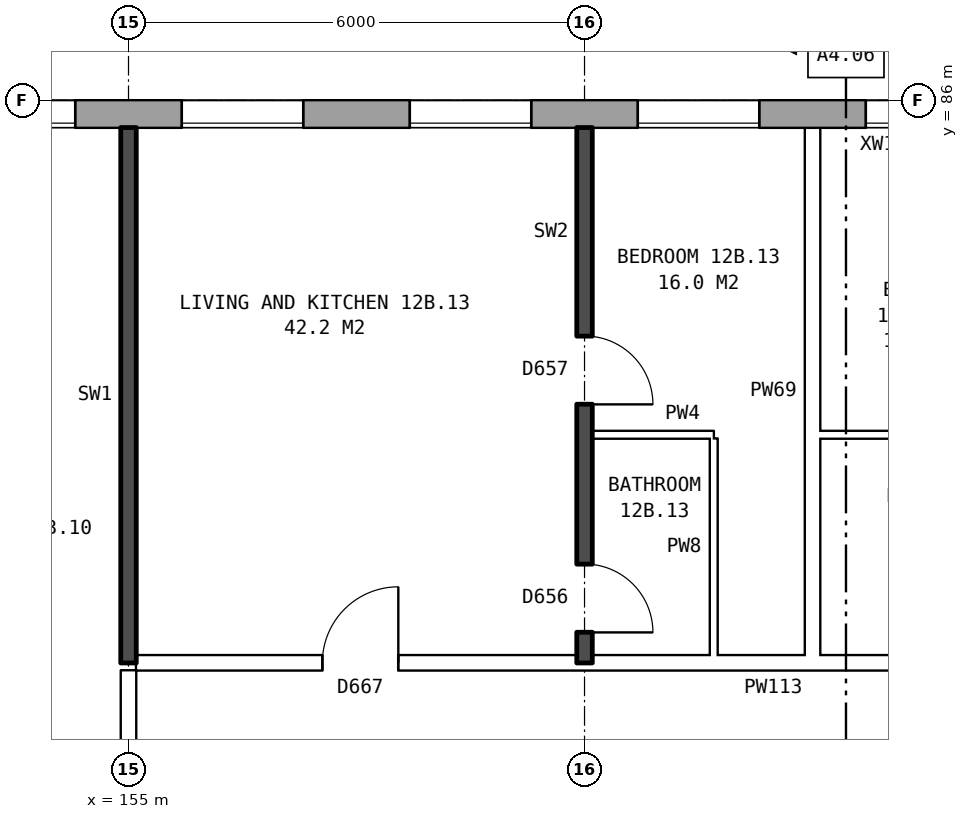
"""IFC4 building model, lengths in metres.
Left out: names, types, materials, properties, quantities, classifications, styles, units other than length and angle.
Written with IfcOpenShell. Run it as: python <this file> out.ifc"""

import sys

from ifc_helpers import new_model, si_unit, direction, frame, frame_2d, origin, place, context, subcontext, project, spatial, rectangle, extrude, element, fill, save


model = new_model("IFC4")
c1 = context("Model", 3, precision=1e-05, world=origin(), true_north=direction((0.0, 1.0)))
c2 = subcontext(c1, "Body", "Model", "MODEL_VIEW")
j1 = project(units=[si_unit("LENGTHUNIT", "METRE"), si_unit("PLANEANGLEUNIT", "RADIAN")], contexts=[c1])
p1 = place(None, origin())
s1 = spatial("IfcSite", under=j1, at=p1, CompositionType="ELEMENT")
p2 = place(p1, origin())
s2 = spatial("IfcBuilding", under=s1, at=p2, CompositionType="ELEMENT")
p3 = place(p2, frame((0.0, 0.0, 47.4)))
s3 = spatial("IfcBuildingStorey", under=s2, at=p3, CompositionType="ELEMENT", Elevation=47.4)
p4 = place(p3, frame((173.425, 85.82, 0.0), z_axis=(0.0, 0.0, 1.0), x_axis=(-1.0, 0.0, 0.0)))
e1 = element("IfcWall", 1, at=p4, inside=s3, PredefinedType="STANDARD", context=c2, shape_type="SweptSolid", body=[
    extrude(rectangle(XDim=39.351, YDim=0.36, at=frame_2d((19.675, 0.0))), origin(), (0.0, 0.0, 1.0), 2.85),
])
p5 = place(p4, frame((0.625, 0.0, 0.8)))
e2 = element("IfcOpeningElement", 2, at=p5, cuts=e1, PredefinedType="OPENING", context=c2, shape_type="SweptSolid", body=[
    extrude(rectangle(XDim=1.0, YDim=1.8, at=frame_2d((0.5, 0.9))), frame((0.0, 0.19, 0.0), z_axis=(0.0, -1.0, 0.0), x_axis=(1.0, 0.0, 0.0)), (0.0, 0.0, 1.0), 0.38),
])
p6 = place(p4, frame((1.925, 0.0, 1.7)))
e3 = element("IfcOpeningElement", 3, at=p6, cuts=e1, PredefinedType="OPENING", context=c2, shape_type="SweptSolid", body=[
    extrude(rectangle(XDim=0.8, YDim=0.9, at=frame_2d((0.4, 0.45))), frame((0.0, 0.19, 0.0), z_axis=(0.0, -1.0, 0.0), x_axis=(1.0, 0.0, 0.0)), (0.0, 0.0, 1.0), 0.38),
])
p7 = place(p4, frame((7.125, 0.0, 0.8)))
e4 = element("IfcOpeningElement", 4, at=p7, cuts=e1, PredefinedType="OPENING", context=c2, shape_type="SweptSolid", body=[
    extrude(rectangle(XDim=1.6, YDim=1.8, at=frame_2d((0.8, 0.9))), frame((0.0, 0.19, 0.0), z_axis=(0.0, -1.0, 0.0), x_axis=(1.0, 0.0, 0.0)), (0.0, 0.0, 1.0), 0.38),
])
p8 = place(p4, frame((10.125, 0.0, 0.8)))
e5 = element("IfcOpeningElement", 5, at=p8, cuts=e1, PredefinedType="OPENING", context=c2, shape_type="SweptSolid", body=[
    extrude(rectangle(XDim=1.6, YDim=1.8, at=frame_2d((0.8, 0.9))), frame((0.0, 0.19, 0.0), z_axis=(0.0, -1.0, 0.0), x_axis=(1.0, 0.0, 0.0)), (0.0, 0.0, 1.0), 0.38),
])
p9 = place(p4, frame((13.125, 0.0, 0.8)))
e6 = element("IfcOpeningElement", 6, at=p9, cuts=e1, PredefinedType="OPENING", context=c2, shape_type="SweptSolid", body=[
    extrude(rectangle(XDim=1.6, YDim=1.8, at=frame_2d((0.8, 0.9))), frame((0.0, 0.19, 0.0), z_axis=(0.0, -1.0, 0.0), x_axis=(1.0, 0.0, 0.0)), (0.0, 0.0, 1.0), 0.38),
])
p10 = place(p4, frame((16.125, 0.0, 0.8)))
e7 = element("IfcOpeningElement", 7, at=p10, cuts=e1, PredefinedType="OPENING", context=c2, shape_type="SweptSolid", body=[
    extrude(rectangle(XDim=1.6, YDim=1.8, at=frame_2d((0.8, 0.9))), frame((0.0, 0.19, 0.0), z_axis=(0.0, -1.0, 0.0), x_axis=(1.0, 0.0, 0.0)), (0.0, 0.0, 1.0), 0.38),
])
p11 = place(p4, frame((19.125, 0.0, 0.8)))
e8 = element("IfcOpeningElement", 8, at=p11, cuts=e1, PredefinedType="OPENING", context=c2, shape_type="SweptSolid", body=[
    extrude(rectangle(XDim=1.6, YDim=1.8, at=frame_2d((0.8, 0.9))), frame((0.0, 0.19, 0.0), z_axis=(0.0, -1.0, 0.0), x_axis=(1.0, 0.0, 0.0)), (0.0, 0.0, 1.0), 0.38),
])
p12 = place(p4, frame((22.125, 0.0, 0.8)))
e9 = element("IfcOpeningElement", 9, at=p12, cuts=e1, PredefinedType="OPENING", context=c2, shape_type="SweptSolid", body=[
    extrude(rectangle(XDim=1.6, YDim=1.8, at=frame_2d((0.8, 0.9))), frame((0.0, 0.19, 0.0), z_axis=(0.0, -1.0, 0.0), x_axis=(1.0, 0.0, 0.0)), (0.0, 0.0, 1.0), 0.38),
])
p13 = place(p4, frame((25.125, 0.0, 0.8)))
e10 = element("IfcOpeningElement", 10, at=p13, cuts=e1, PredefinedType="OPENING", context=c2, shape_type="SweptSolid", body=[
    extrude(rectangle(XDim=1.6, YDim=1.8, at=frame_2d((0.8, 0.9))), frame((0.0, 0.19, 0.0), z_axis=(0.0, -1.0, 0.0), x_axis=(1.0, 0.0, 0.0)), (0.0, 0.0, 1.0), 0.38),
])
p14 = place(p4, frame((28.125, 0.0, 0.8)))
e11 = element("IfcOpeningElement", 11, at=p14, cuts=e1, PredefinedType="OPENING", context=c2, shape_type="SweptSolid", body=[
    extrude(rectangle(XDim=1.6, YDim=1.8, at=frame_2d((0.8, 0.9))), frame((0.0, 0.19, 0.0), z_axis=(0.0, -1.0, 0.0), x_axis=(1.0, 0.0, 0.0)), (0.0, 0.0, 1.0), 0.38),
])
p15 = place(p4, frame((31.125, 0.0, 0.8)))
e12 = element("IfcOpeningElement", 12, at=p15, cuts=e1, PredefinedType="OPENING", context=c2, shape_type="SweptSolid", body=[
    extrude(rectangle(XDim=1.6, YDim=1.8, at=frame_2d((0.8, 0.9))), frame((0.0, 0.19, 0.0), z_axis=(0.0, -1.0, 0.0), x_axis=(1.0, 0.0, 0.0)), (0.0, 0.0, 1.0), 0.38),
])
p16 = place(p4, frame((33.025, 0.0, 0.8)))
e13 = element("IfcOpeningElement", 13, at=p16, cuts=e1, PredefinedType="OPENING", context=c2, shape_type="SweptSolid", body=[
    extrude(rectangle(XDim=1.2, YDim=1.8, at=frame_2d((0.6, 0.9))), frame((0.0, 0.19, 0.0), z_axis=(0.0, -1.0, 0.0), x_axis=(1.0, 0.0, 0.0)), (0.0, 0.0, 1.0), 0.38),
])
p17 = place(p4, frame((36.625, 0.0, 1.7)))
e14 = element("IfcOpeningElement", 14, at=p17, cuts=e1, PredefinedType="OPENING", context=c2, shape_type="SweptSolid", body=[
    extrude(rectangle(XDim=0.8, YDim=0.9, at=frame_2d((0.4, 0.45))), frame((0.0, 0.19, 0.0), z_axis=(0.0, -1.0, 0.0), x_axis=(1.0, 0.0, 0.0)), (0.0, 0.0, 1.0), 0.38),
])
p18 = place(p4, frame((3.925, 0.0, 0.8)))
e15 = element("IfcOpeningElement", 15, at=p18, cuts=e1, PredefinedType="OPENING", context=c2, shape_type="SweptSolid", body=[
    extrude(rectangle(XDim=0.8, YDim=0.9, at=frame_2d((0.4, 0.45))), frame((0.0, 0.19, 0.0), z_axis=(0.0, -1.0, 0.0), x_axis=(1.0, 0.0, 0.0)), (0.0, 0.0, 1.0), 0.38),
])
p19 = place(p4, frame((5.025, 0.0, 0.8)))
e16 = element("IfcOpeningElement", 16, at=p19, cuts=e1, PredefinedType="OPENING", context=c2, shape_type="SweptSolid", body=[
    extrude(rectangle(XDim=1.2, YDim=1.8, at=frame_2d((0.6, 0.9))), frame((0.0, 0.19, 0.0), z_axis=(0.0, -1.0, 0.0), x_axis=(1.0, 0.0, 0.0)), (0.0, 0.0, 1.0), 0.38),
])
p20 = place(p4, frame((34.525, 0.0, 0.8)))
e17 = element("IfcOpeningElement", 17, at=p20, cuts=e1, PredefinedType="OPENING", context=c2, shape_type="SweptSolid", body=[
    extrude(rectangle(XDim=0.8, YDim=0.9, at=frame_2d((0.4, 0.45))), frame((0.0, 0.19, 0.0), z_axis=(0.0, -1.0, 0.0), x_axis=(1.0, 0.0, 0.0)), (0.0, 0.0, 1.0), 0.38),
])
p21 = place(p4, frame((37.725, 0.0, 0.8)))
e18 = element("IfcOpeningElement", 18, at=p21, cuts=e1, PredefinedType="OPENING", context=c2, shape_type="SweptSolid", body=[
    extrude(rectangle(XDim=1.2, YDim=1.8, at=frame_2d((0.6, 0.9))), frame((0.0, 0.19, 0.0), z_axis=(0.0, -1.0, 0.0), x_axis=(1.0, 0.0, 0.0)), (0.0, 0.0, 1.0), 0.38),
])
p22 = place(p3, frame((155.1, 78.6, 0.0), z_axis=(0.0, 0.0, 1.0), x_axis=(1.0, 0.0, 0.0)))
e19 = element("IfcWall", 19, at=p22, inside=s3, PredefinedType="PARTITIONING", context=c2, shape_type="SweptSolid", body=[
    extrude(rectangle(XDim=21.04, YDim=0.2, at=frame_2d((10.52, 0.0))), origin(), (0.0, 0.0, 1.0), 2.85),
])
p23 = place(p22, frame((2.45, 0.0, 0.0)))
e20 = element("IfcOpeningElement", 20, at=p23, cuts=e19, PredefinedType="OPENING", context=c2, shape_type="SweptSolid", body=[
    extrude(rectangle(XDim=1.0, YDim=2.1, at=frame_2d((0.5, 1.05))), frame((0.0, 0.11, 0.0), z_axis=(0.0, -1.0, 0.0), x_axis=(1.0, 0.0, 0.0)), (0.0, 0.0, 1.0), 0.22),
])
p24 = place(p22, frame((14.4, 0.0, 0.0)))
e21 = element("IfcOpeningElement", 21, at=p24, cuts=e19, PredefinedType="OPENING", context=c2, shape_type="SweptSolid", body=[
    extrude(rectangle(XDim=1.0, YDim=2.1, at=frame_2d((0.5, 1.05))), frame((0.0, 0.11, 0.0), z_axis=(0.0, -1.0, 0.0), x_axis=(1.0, 0.0, 0.0)), (0.0, 0.0, 1.0), 0.22),
])
p25 = place(p3, frame((161.1, 81.6, 0.0), z_axis=(0.0, 0.0, 1.0), x_axis=(1.0, 0.0, 0.0)))
e22 = element("IfcWall", 22, at=p25, inside=s3, PredefinedType="PARTITIONING", context=c2, shape_type="SweptSolid", body=[
    extrude(rectangle(XDim=1.6, YDim=0.1, at=frame_2d((0.8, 0.0))), origin(), (0.0, 0.0, 1.0), 2.85),
])
p26 = place(p3, frame((164.1, 81.6, 0.0), z_axis=(0.0, 0.0, 1.0), x_axis=(1.0, 0.0, 0.0)))
e23 = element("IfcWall", 23, at=p26, inside=s3, PredefinedType="PARTITIONING", context=c2, shape_type="SweptSolid", body=[
    extrude(rectangle(XDim=2.8, YDim=0.1, at=frame_2d((1.4, 0.0))), origin(), (0.0, 0.0, 1.0), 2.85),
])
p27 = place(p3, frame((155.0, 76.3, 0.0), z_axis=(0.0, 0.0, 1.0), x_axis=(0.0, 1.0, 0.0)))
e24 = element("IfcWall", 24, at=p27, inside=s3, PredefinedType="PARTITIONING", context=c2, shape_type="SweptSolid", body=[
    extrude(rectangle(XDim=2.2, YDim=0.2, at=frame_2d((1.1, 0.0))), origin(), (0.0, 0.0, 1.0), 2.85),
])
p28 = place(p3, frame((155.0, 78.6, 0.0), z_axis=(0.0, 0.0, 1.0), x_axis=(0.0, 1.0, 0.0)))
e25 = element("IfcWall", 25, at=p28, inside=s3, PredefinedType="SOLIDWALL", context=c2, shape_type="SweptSolid", body=[
    extrude(rectangle(XDim=7.04, YDim=0.2, at=frame_2d((3.52, 0.0))), origin(), (0.0, 0.0, 1.0), 2.85),
])
p29 = place(p3, frame((161.0, 78.6, 0.0), z_axis=(0.0, 0.0, 1.0), x_axis=(0.0, 1.0, 0.0)))
e26 = element("IfcWall", 26, at=p29, inside=s3, PredefinedType="SOLIDWALL", context=c2, shape_type="SweptSolid", body=[
    extrude(rectangle(XDim=7.04, YDim=0.2, at=frame_2d((3.52, 0.0))), origin(), (0.0, 0.0, 1.0), 2.85),
])
p30 = place(p29, frame((3.4, 0.0, 0.0)))
e27 = element("IfcOpeningElement", 27, at=p30, cuts=e26, PredefinedType="OPENING", context=c2, shape_type="SweptSolid", body=[
    extrude(rectangle(XDim=0.9, YDim=2.1, at=frame_2d((0.45, 1.05))), frame((0.0, 0.11, 0.0), z_axis=(0.0, -1.0, 0.0), x_axis=(1.0, 0.0, 0.0)), (0.0, 0.0, 1.0), 0.22),
])
p31 = place(p29, frame((0.4, 0.0, 0.0)))
e28 = element("IfcOpeningElement", 28, at=p31, cuts=e26, PredefinedType="OPENING", context=c2, shape_type="SweptSolid", body=[
    extrude(rectangle(XDim=0.9, YDim=2.1, at=frame_2d((0.45, 1.05))), frame((0.0, 0.11, 0.0), z_axis=(0.0, -1.0, 0.0), x_axis=(1.0, 0.0, 0.0)), (0.0, 0.0, 1.0), 0.22),
])
p32 = place(p3, frame((162.7, 78.7, 0.0), z_axis=(0.0, 0.0, 1.0), x_axis=(0.0, 1.0, 0.0)))
e29 = element("IfcWall", 29, at=p32, inside=s3, PredefinedType="PARTITIONING", context=c2, shape_type="SweptSolid", body=[
    extrude(rectangle(XDim=2.85, YDim=0.1, at=frame_2d((1.425, 0.0))), origin(), (0.0, 0.0, 1.0), 2.85),
])
p33 = place(p3, frame((164.0, 78.7, 0.0), z_axis=(0.0, 0.0, 1.0), x_axis=(0.0, 1.0, 0.0)))
e30 = element("IfcWall", 30, at=p33, inside=s3, PredefinedType="PARTITIONING", context=c2, shape_type="SweptSolid", body=[
    extrude(rectangle(XDim=6.94, YDim=0.2, at=frame_2d((3.47, 0.0))), origin(), (0.0, 0.0, 1.0), 2.85),
])
p34 = place(p7, origin())
e31 = element("IfcWindow", 31, at=p34, inside=s3, PartitioningType="SINGLE_PANEL", PredefinedType="WINDOW", context=c2, shape_type="SweptSolid", body=[
    extrude(rectangle(XDim=1.6, YDim=1.8, at=frame_2d((0.8, 0.9))), frame((0.0, 0.15, 0.0), z_axis=(0.0, -1.0, 0.0), x_axis=(1.0, 0.0, 0.0)), (0.0, 0.0, 1.0), 0.06),
])
fill(e4, e31)
p35 = place(p8, origin())
e32 = element("IfcWindow", 32, at=p35, inside=s3, PartitioningType="SINGLE_PANEL", PredefinedType="WINDOW", context=c2, shape_type="SweptSolid", body=[
    extrude(rectangle(XDim=1.6, YDim=1.8, at=frame_2d((0.8, 0.9))), frame((0.0, 0.15, 0.0), z_axis=(0.0, -1.0, 0.0), x_axis=(1.0, 0.0, 0.0)), (0.0, 0.0, 1.0), 0.06),
])
fill(e5, e32)
p36 = place(p9, origin())
e33 = element("IfcWindow", 33, at=p36, inside=s3, PartitioningType="SINGLE_PANEL", PredefinedType="WINDOW", context=c2, shape_type="SweptSolid", body=[
    extrude(rectangle(XDim=1.6, YDim=1.8, at=frame_2d((0.8, 0.9))), frame((0.0, 0.15, 0.0), z_axis=(0.0, -1.0, 0.0), x_axis=(1.0, 0.0, 0.0)), (0.0, 0.0, 1.0), 0.06),
])
fill(e6, e33)
p37 = place(p10, origin())
e34 = element("IfcWindow", 34, at=p37, inside=s3, PartitioningType="SINGLE_PANEL", PredefinedType="WINDOW", context=c2, shape_type="SweptSolid", body=[
    extrude(rectangle(XDim=1.6, YDim=1.8, at=frame_2d((0.8, 0.9))), frame((0.0, 0.15, 0.0), z_axis=(0.0, -1.0, 0.0), x_axis=(1.0, 0.0, 0.0)), (0.0, 0.0, 1.0), 0.06),
])
fill(e7, e34)
p38 = place(p11, origin())
e35 = element("IfcWindow", 35, at=p38, inside=s3, PartitioningType="SINGLE_PANEL", PredefinedType="WINDOW", context=c2, shape_type="SweptSolid", body=[
    extrude(rectangle(XDim=1.6, YDim=1.8, at=frame_2d((0.8, 0.9))), frame((0.0, 0.15, 0.0), z_axis=(0.0, -1.0, 0.0), x_axis=(1.0, 0.0, 0.0)), (0.0, 0.0, 1.0), 0.06),
])
fill(e8, e35)
p39 = place(p30, frame((0.9, 0.0, 0.0), z_axis=(0.0, 0.0, 1.0), x_axis=(-1.0, 0.0, 0.0)))
e36 = element("IfcDoor", 36, at=p39, inside=s3, OperationType="SINGLE_SWING_RIGHT", PredefinedType="DOOR", context=c2, shape_type="SweptSolid", body=[
    extrude(rectangle(XDim=0.9, YDim=2.1, at=frame_2d((0.45, 1.05))), frame((0.0, 0.025, 0.0), z_axis=(0.0, -1.0, 0.0), x_axis=(1.0, 0.0, 0.0)), (0.0, 0.0, 1.0), 0.05),
])
fill(e27, e36)
p40 = place(p23, origin())
e37 = element("IfcDoor", 37, at=p40, inside=s3, OperationType="SINGLE_SWING_RIGHT", PredefinedType="DOOR", context=c2, shape_type="SweptSolid", body=[
    extrude(rectangle(XDim=1.0, YDim=2.1, at=frame_2d((0.5, 1.05))), frame((0.0, 0.025, 0.0), z_axis=(0.0, -1.0, 0.0), x_axis=(1.0, 0.0, 0.0)), (0.0, 0.0, 1.0), 0.05),
])
fill(e20, e37)
p41 = place(p31, frame((0.9, 0.0, 0.0), z_axis=(0.0, 0.0, 1.0), x_axis=(-1.0, 0.0, 0.0)))
e38 = element("IfcDoor", 38, at=p41, inside=s3, OperationType="SINGLE_SWING_RIGHT", PredefinedType="DOOR", context=c2, shape_type="SweptSolid", body=[
    extrude(rectangle(XDim=0.9, YDim=2.1, at=frame_2d((0.45, 1.05))), frame((0.0, 0.025, 0.0), z_axis=(0.0, -1.0, 0.0), x_axis=(1.0, 0.0, 0.0)), (0.0, 0.0, 1.0), 0.05),
])
fill(e28, e38)
save(model, sys.argv[1])
